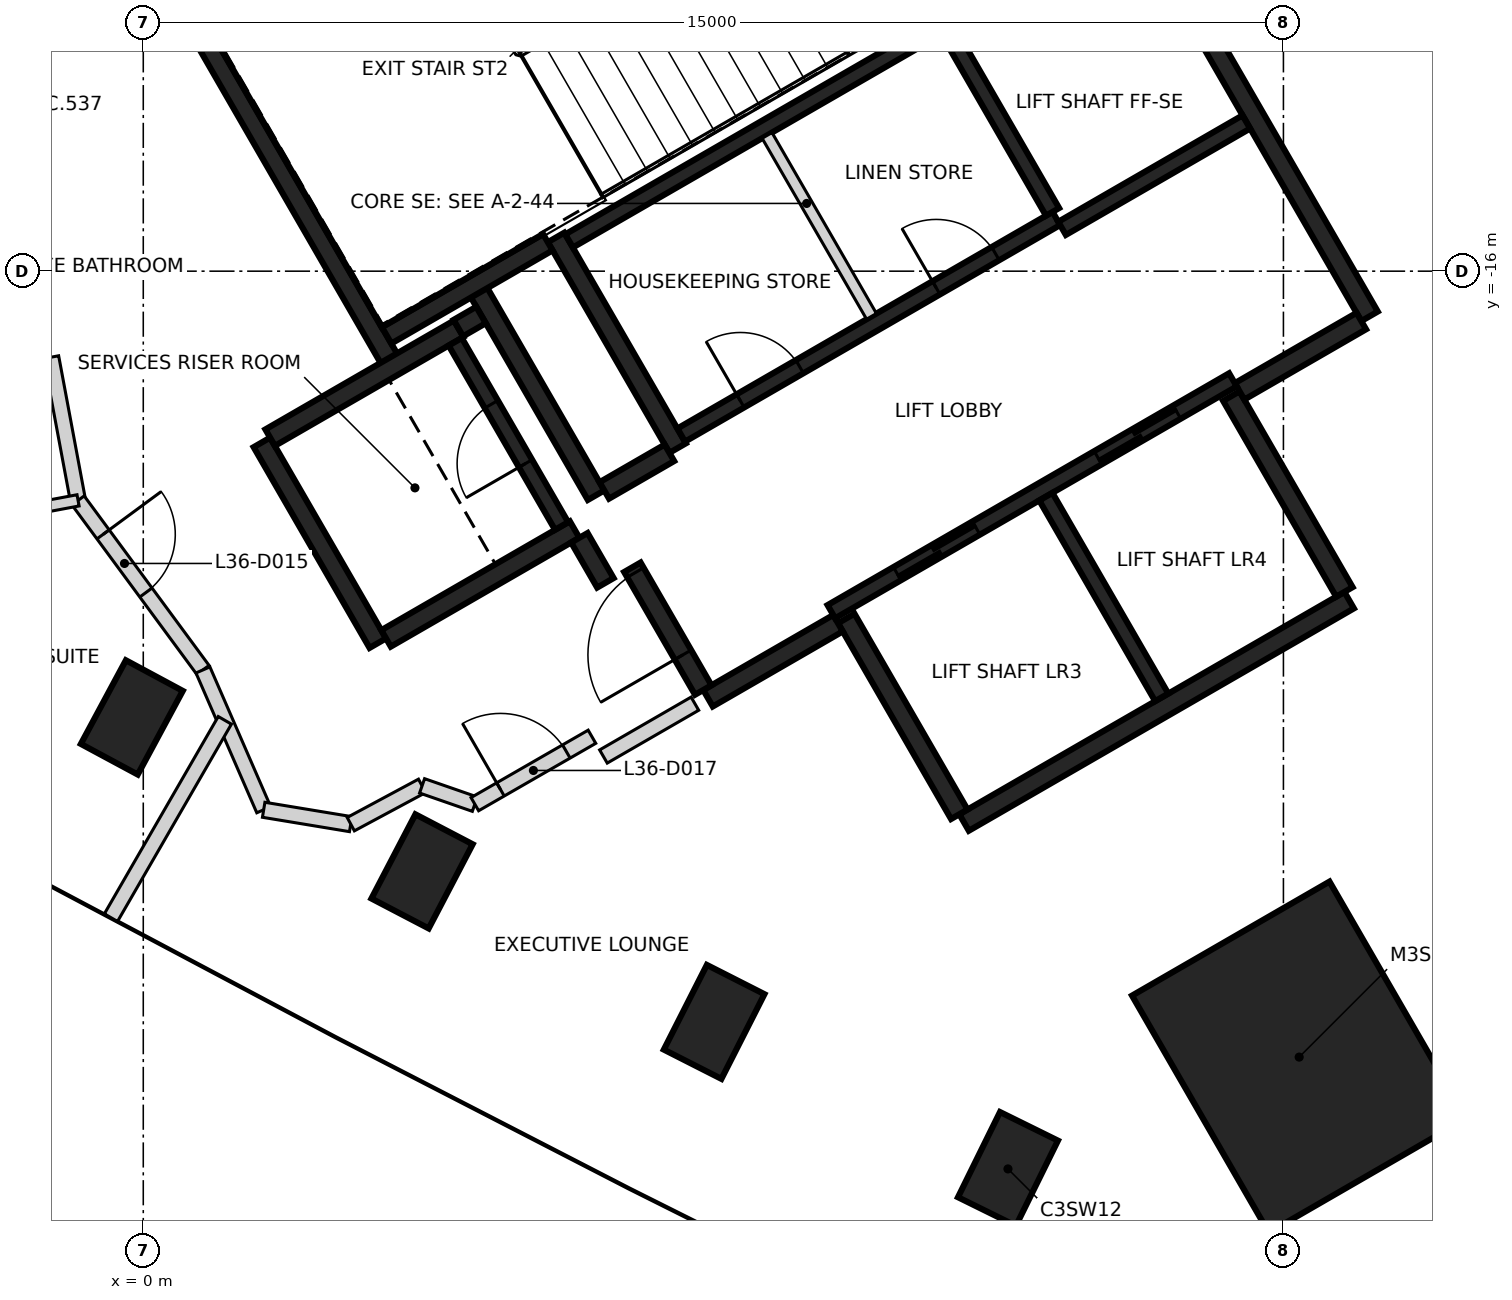
"""IFC4 building model, lengths in metres.
Left out: names, types, materials, properties, quantities, classifications, styles, units other than length and angle.
Written with IfcOpenShell. Run it as: python <this file> out.ifc"""

import sys

from ifc_helpers import new_model, si_unit, direction, frame, frame_2d, origin, origin_2d, place, context, subcontext, project, spatial, rectangle, extrude, element, fill, save


model = new_model("IFC4")
c1 = context("Model", 3, precision=1e-05, world=origin(), true_north=direction((0.0, 1.0)))
c2 = subcontext(c1, "Body", "Model", "MODEL_VIEW")
j1 = project(units=[si_unit("LENGTHUNIT", "METRE"), si_unit("PLANEANGLEUNIT", "RADIAN")], contexts=[c1])
p1 = place(None, origin())
s1 = spatial("IfcSite", under=j1, at=p1, CompositionType="ELEMENT")
p2 = place(p1, origin())
s2 = spatial("IfcBuilding", under=s1, at=p2, CompositionType="ELEMENT")
p3 = place(p2, frame((0.0, 0.0, 146.8)))
s3 = spatial("IfcBuildingStorey", under=s2, at=p3, CompositionType="ELEMENT", Elevation=146.8)
for number, where, z_axis, x_axis in (
    (1, (-0.151, -21.871, -0.4), (0.0, 0.0, 1.0), (0.474, 0.881, 0.0)),
    (2, (3.667, -23.896, -0.4), (0.0, 0.0, 1.0), (0.463, 0.886, 0.0)),
    (3, (7.51, -25.876, -0.4), (0.0, 0.0, 1.0), (0.453, 0.892, 0.0)),
    (4, (11.376, -27.811, -0.4), (0.0, 0.0, 1.0), (0.442, 0.897, 0.0)),
):
    element("IfcColumn", number, at=place(p3, frame(where, z_axis=z_axis, x_axis=x_axis)), inside=s3, PredefinedType="COLUMN", context=c2, shape_type="SweptSolid", body=[
        extrude(rectangle(XDim=1.25, YDim=0.85, at=origin_2d()), origin(), (0.0, 0.0, 1.0), 3.6),
    ])
p4 = place(p3, frame((15.207, -26.34, -0.4), z_axis=(0.0, 0.0, 1.0), x_axis=(-0.5, 0.866025403784, 0.0)))
e5 = element("IfcColumn", 5, at=p4, inside=s3, PredefinedType="COLUMN", context=c2, shape_type="SweptSolid", body=[
    extrude(rectangle(XDim=3.6, YDim=3.0, at=origin_2d()), origin(), (0.0, 0.0, 1.0), 3.6),
])
p5 = place(p3, frame((13.008, -11.181, 0.0), z_axis=(0.0, 0.0, 1.0), x_axis=(0.500004234368, -0.866022959057, 0.0)))
e6 = element("IfcWall", 6, at=p5, inside=s3, PredefinedType="SHEAR", context=c2, shape_type="SweptSolid", body=[
    extrude(rectangle(XDim=6.25, YDim=0.25, at=frame_2d((3.125, 0.0))), origin(), (0.0, 0.0, 1.0), 3.2),
])
p6 = place(p3, frame((15.865, -20.328, 0.0), z_axis=(0.0, 0.0, 1.0), x_axis=(-0.86602852612, -0.499994591916, 0.0)))
e7 = element("IfcWall", 7, at=p6, inside=s3, PredefinedType="SHEAR", context=c2, shape_type="SweptSolid", body=[
    extrude(rectangle(XDim=5.85, YDim=0.25, at=frame_2d((2.925, 0.0))), origin(), (0.0, 0.0, 1.0), 3.2),
])
p7 = place(p3, frame((3.235, -17.153, 0.0), z_axis=(0.0, 0.0, 1.0), x_axis=(-0.500008851346, 0.866020293397, 0.0)))
e8 = element("IfcWall", 8, at=p7, inside=s3, PredefinedType="SHEAR", context=c2, shape_type="SweptSolid", body=[
    extrude(rectangle(XDim=5.51, YDim=0.25, at=frame_2d((2.755, 0.0))), origin(), (0.0, 0.0, 1.0), 3.2),
])
p8 = place(p3, frame((7.031, -18.327, 0.0), z_axis=(0.0, 0.0, 1.0), x_axis=(-0.499971222258, 0.866042017984, 0.0)))
e9 = element("IfcWall", 9, at=p8, inside=s3, PredefinedType="SHEAR", context=c2, shape_type="SweptSolid", body=[
    extrude(rectangle(XDim=3.2, YDim=0.25, at=frame_2d((1.6, 0.0))), origin(), (0.0, 0.0, 1.0), 3.2),
])
for number, where, z_axis, x_axis in (
    (10, (14.315, -17.644, 0.0), (0.0, 0.0, 1.0), (0.5, -0.866, 0.0)),
    (11, (10.736, -23.145, 0.0), (0.0, 0.0, 1.0), (-0.5, 0.866, 0.0)),
):
    element("IfcWall", number, at=place(p3, frame(where, z_axis=z_axis, x_axis=x_axis)), inside=s3, PredefinedType="SHEAR", context=c2, shape_type="SweptSolid", body=[
        extrude(rectangle(XDim=2.974, YDim=0.25, at=frame_2d((1.487, 0.0))), origin(), (0.0, 0.0, 1.0), 3.2),
    ])
p9 = place(p3, frame((3.085, -20.894, 0.0), z_axis=(0.0, 0.0, 1.0), x_axis=(-0.499978833458, 0.866037623948, 0.0)))
e12 = element("IfcWall", 12, at=p9, inside=s3, PredefinedType="SHEAR", context=c2, shape_type="SweptSolid", body=[
    extrude(rectangle(XDim=3.05, YDim=0.25, at=frame_2d((1.525, 0.0))), origin(), (0.0, 0.0, 1.0), 3.2),
])
p10 = place(p3, frame((1.669, -18.19, 0.0), z_axis=(0.0, 0.0, 1.0), x_axis=(0.866042235819, 0.499970844928, 0.0)))
e13 = element("IfcWall", 13, at=p10, inside=s3, PredefinedType="SHEAR", context=c2, shape_type="SweptSolid", body=[
    extrude(rectangle(XDim=2.865, YDim=0.25, at=frame_2d((1.432, 0.0))), origin(), (0.0, 0.0, 1.0), 3.2),
])
p11 = place(p3, frame((5.675, -19.399, 0.0), z_axis=(0.0, 0.0, 1.0), x_axis=(-0.866026637627, -0.499997862916, 0.0)))
e14 = element("IfcWall", 14, at=p11, inside=s3, PredefinedType="SHEAR", context=c2, shape_type="SweptSolid", body=[
    extrude(rectangle(XDim=2.865, YDim=0.25, at=frame_2d((1.432, 0.0))), origin(), (0.0, 0.0, 1.0), 3.2),
])
p12 = place(p3, frame((4.414, -16.276, 0.0), z_axis=(0.0, 0.0, 1.0), x_axis=(0.500003324108, -0.866023484601, 0.0)))
e15 = element("IfcWall", 15, at=p12, inside=s3, PredefinedType="SHEAR", context=c2, shape_type="SweptSolid", body=[
    extrude(rectangle(XDim=3.085, YDim=0.25, at=frame_2d((1.542, 0.0))), origin(), (0.0, 0.0, 1.0), 3.2),
])
p13 = place(p3, frame((5.322, -15.619, 0.0), z_axis=(0.0, 0.0, 1.0), x_axis=(-0.866026229868, -0.499998569178, 0.0)))
e16 = element("IfcWall", 16, at=p13, inside=s3, PredefinedType="SHEAR", context=c2, shape_type="SweptSolid", body=[
    extrude(rectangle(XDim=2.449, YDim=0.25, at=frame_2d((1.225, 0.0))), origin(), (0.0, 0.0, 1.0), 3.2),
])
p14 = place(p3, frame((9.14, -20.631, 0.0), z_axis=(0.0, 0.0, 1.0), x_axis=(-0.866043531843, -0.499968599967, 0.0)))
e17 = element("IfcWall", 17, at=p14, inside=s3, PredefinedType="SHEAR", context=c2, shape_type="SweptSolid", body=[
    extrude(rectangle(XDim=1.975, YDim=0.25, at=frame_2d((0.987, 0.0))), origin(), (0.0, 0.0, 1.0), 3.2),
])
p15 = place(p3, frame((16.025, -16.656, 0.0), z_axis=(0.0, 0.0, 1.0), x_axis=(-0.866016279763, -0.500015802937, 0.0)))
e18 = element("IfcWall", 18, at=p15, inside=s3, PredefinedType="SHEAR", context=c2, shape_type="SweptSolid", body=[
    extrude(rectangle(XDim=1.849, YDim=0.25, at=frame_2d((0.925, 0.0))), origin(), (0.0, 0.0, 1.0), 3.2),
])
p16 = place(p3, frame((7.367, -21.51, 0.0), z_axis=(0.0, 0.0, 1.0), x_axis=(-0.499983108224, 0.866035156036, 0.0)))
e19 = element("IfcWall", 19, at=p16, inside=s3, PredefinedType="SHEAR", context=c2, shape_type="SweptSolid", body=[
    extrude(rectangle(XDim=1.865, YDim=0.25, at=frame_2d((0.932, 0.0))), origin(), (0.0, 0.0, 1.0), 3.2),
])
p17 = place(p16, frame((0.535, 0.0, 0.0)))
e20 = element("IfcOpeningElement", 20, at=p17, cuts=e19, PredefinedType="OPENING", context=c2, shape_type="SweptSolid", body=[
    extrude(rectangle(XDim=1.25, YDim=2.1, at=frame_2d((0.625, 1.05))), frame((0.0, 0.135, 0.0), z_axis=(0.0, -1.0, 0.0), x_axis=(1.0, 0.0, 0.0)), (0.0, 0.0, 1.0), 0.27),
])
p18 = place(p3, frame((6.065, -18.885, 0.0), z_axis=(0.0, 0.0, 1.0), x_axis=(0.866017078145, 0.500014420154, 0.0)))
e21 = element("IfcWall", 21, at=p18, inside=s3, PredefinedType="SHEAR", context=c2, shape_type="SweptSolid", body=[
    extrude(rectangle(XDim=0.989, YDim=0.25, at=frame_2d((0.495, 0.0))), origin(), (0.0, 0.0, 1.0), 3.2),
])
p19 = place(p3, frame((6.08, -20.1, 0.0), z_axis=(0.0, 0.0, 1.0), x_axis=(-0.500051773299, 0.865995510393, 0.0)))
e22 = element("IfcWall", 22, at=p19, inside=s3, PredefinedType="SHEAR", context=c2, shape_type="SweptSolid", body=[
    extrude(rectangle(XDim=0.685, YDim=0.25, at=frame_2d((0.342, 0.0))), origin(), (0.0, 0.0, 1.0), 3.2),
])
p20 = place(p3, frame((4.145, -16.749, 0.0), z_axis=(0.0, 0.0, 1.0), x_axis=(0.866185586049, 0.49972245349, 0.0)))
e23 = element("IfcWall", 23, at=p20, inside=s3, PredefinedType="SHEAR", context=c2, shape_type="SweptSolid", body=[
    extrude(rectangle(XDim=0.344, YDim=0.25, at=frame_2d((0.172, 0.0))), origin(), (0.0, 0.0, 1.0), 3.2),
])
p21 = place(p3, frame((9.052, -20.48, 0.0), z_axis=(0.0, 0.0, 1.0), x_axis=(0.866030299012, 0.499991521122, 0.0)))
e24 = element("IfcWall", 24, at=p21, inside=s3, PredefinedType="SHEAR", context=c2, shape_type="SweptSolid", body=[
    extrude(rectangle(XDim=6.1, YDim=0.2, at=frame_2d((3.05, 0.0))), origin(), (0.0, 0.0, 1.0), 3.2),
])
p22 = place(p21, frame((1.0, 0.0, 0.0)))
e25 = element("IfcOpeningElement", 25, at=p22, cuts=e24, PredefinedType="OPENING", context=c2, shape_type="SweptSolid", body=[
    extrude(rectangle(XDim=1.2, YDim=2.1, at=frame_2d((0.6, 1.05))), frame((0.0, 0.11, 0.0), z_axis=(0.0, -1.0, 0.0), x_axis=(1.0, 0.0, 0.0)), (0.0, 0.0, 1.0), 0.22),
])
p23 = place(p21, frame((4.05, 0.0, 0.0)))
e26 = element("IfcOpeningElement", 26, at=p23, cuts=e24, PredefinedType="OPENING", context=c2, shape_type="SweptSolid", body=[
    extrude(rectangle(XDim=1.2, YDim=2.1, at=frame_2d((0.6, 1.05))), frame((0.0, 0.11, 0.0), z_axis=(0.0, -1.0, 0.0), x_axis=(1.0, 0.0, 0.0)), (0.0, 0.0, 1.0), 0.22),
])
p24 = place(p3, frame((10.538, -12.752, 0.0), z_axis=(0.0, 0.0, 1.0), x_axis=(-0.866038630372, -0.499977090179, 0.0)))
e27 = element("IfcWall", 27, at=p24, inside=s3, PredefinedType="SHEAR", context=c2, shape_type="SweptSolid", body=[
    extrude(rectangle(XDim=5.699, YDim=0.2, at=frame_2d((2.85, 0.0))), origin(), (0.0, 0.0, 1.0), 3.2),
])
p25 = place(p3, frame((7.077, -18.156, 0.0), z_axis=(0.0, 0.0, 1.0), x_axis=(0.866038630372, 0.499977090179, 0.0)))
e28 = element("IfcWall", 28, at=p25, inside=s3, PredefinedType="SHEAR", context=c2, shape_type="SweptSolid", body=[
    extrude(rectangle(XDim=5.699, YDim=0.2, at=frame_2d((2.85, 0.0))), origin(), (0.0, 0.0, 1.0), 3.2),
])
p26 = place(p25, frame((0.899, 0.0, 0.0)))
e29 = element("IfcOpeningElement", 29, at=p26, cuts=e28, PredefinedType="OPENING", context=c2, shape_type="SweptSolid", body=[
    extrude(rectangle(XDim=0.9, YDim=2.1, at=frame_2d((0.45, 1.05))), frame((0.0, 0.11, 0.0), z_axis=(0.0, -1.0, 0.0), x_axis=(1.0, 0.0, 0.0)), (0.0, 0.0, 1.0), 0.22),
])
p27 = place(p25, frame((3.874, 0.0, 0.0)))
e30 = element("IfcOpeningElement", 30, at=p27, cuts=e28, PredefinedType="OPENING", context=c2, shape_type="SweptSolid", body=[
    extrude(rectangle(XDim=0.9, YDim=2.1, at=frame_2d((0.45, 1.05))), frame((0.0, 0.11, 0.0), z_axis=(0.0, -1.0, 0.0), x_axis=(1.0, 0.0, 0.0)), (0.0, 0.0, 1.0), 0.22),
])
p28 = place(p3, frame((11.875, -18.967, 0.0), z_axis=(0.0, 0.0, 1.0), x_axis=(0.49998131003, -0.866036194175, 0.0)))
e31 = element("IfcWall", 31, at=p28, inside=s3, PredefinedType="SHEAR", context=c2, shape_type="SweptSolid", body=[
    extrude(rectangle(XDim=3.048, YDim=0.2, at=frame_2d((1.524, 0.0))), origin(), (0.0, 0.0, 1.0), 3.2),
])
p29 = place(p3, frame((5.503, -19.352, 0.0), z_axis=(0.0, 0.0, 1.0), x_axis=(-0.499986818241, 0.866033014143, 0.0)))
e32 = element("IfcWall", 32, at=p29, inside=s3, PredefinedType="SHEAR", context=c2, shape_type="SweptSolid", body=[
    extrude(rectangle(XDim=2.798, YDim=0.2, at=frame_2d((1.399, 0.0))), origin(), (0.0, 0.0, 1.0), 3.2),
])
p30 = place(p29, frame((0.949, 0.0, 0.0)))
e33 = element("IfcOpeningElement", 33, at=p30, cuts=e32, PredefinedType="OPENING", context=c2, shape_type="SweptSolid", body=[
    extrude(rectangle(XDim=0.9, YDim=2.1, at=frame_2d((0.45, 1.05))), frame((0.0, 0.11, 0.0), z_axis=(0.0, -1.0, 0.0), x_axis=(1.0, 0.0, 0.0)), (0.0, 0.0, 1.0), 0.22),
])
p31 = place(p3, frame((11.963, -15.22, 0.0), z_axis=(0.0, 0.0, 1.0), x_axis=(-0.500034990121, 0.866005201286, 0.0)))
e34 = element("IfcWall", 34, at=p31, inside=s3, PredefinedType="SHEAR", context=c2, shape_type="SweptSolid", body=[
    extrude(rectangle(XDim=2.75, YDim=0.2, at=frame_2d((1.375, 0.0))), origin(), (0.0, 0.0, 1.0), 3.2),
])
p32 = place(p3, frame((14.512, -14.037, 0.0), z_axis=(0.0, 0.0, 1.0), x_axis=(-0.866044696403, -0.499966582715, 0.0)))
e35 = element("IfcWall", 35, at=p32, inside=s3, PredefinedType="SHEAR", context=c2, shape_type="SweptSolid", body=[
    extrude(rectangle(XDim=2.799, YDim=0.2, at=frame_2d((1.399, 0.0))), origin(), (0.0, 0.0, 1.0), 3.2),
])
p33 = place(p3, frame((8.207, -14.214, 0.0), z_axis=(0.0, 0.0, 1.0), x_axis=(0.50002746344, -0.86600954718, 0.0)))
e36 = element("IfcWall", 36, at=p33, inside=s3, PredefinedType="PARTITIONING", context=c2, shape_type="SweptSolid", body=[
    extrude(rectangle(XDim=2.748, YDim=0.15, at=frame_2d((1.374, 0.0))), origin(), (0.0, 0.0, 1.0), 3.2),
])
p34 = place(p3, frame((-1.212, -17.131, 0.0), z_axis=(0.0, 0.0, 1.0), x_axis=(0.183680924698, -0.982985919483, 0.0)))
e37 = element("IfcWall", 37, at=p34, inside=s3, PredefinedType="PARTITIONING", context=c2, shape_type="SweptSolid", body=[
    extrude(rectangle(XDim=1.917, YDim=0.2, at=frame_2d((0.958, 0.0))), origin(), (0.0, 0.0, 1.0), 3.2),
])
p35 = place(p3, frame((-0.858, -19.016, 0.0), z_axis=(0.0, 0.0, 1.0), x_axis=(0.593123867414, -0.805111220829, 0.0)))
e38 = element("IfcWall", 38, at=p35, inside=s3, PredefinedType="PARTITIONING", context=c2, shape_type="SweptSolid", body=[
    extrude(rectangle(XDim=2.77, YDim=0.2, at=frame_2d((1.385, 0.0))), origin(), (0.0, 0.0, 1.0), 3.2),
])
p36 = place(p35, frame((0.555, 0.0, 0.0)))
e39 = element("IfcOpeningElement", 39, at=p36, cuts=e38, PredefinedType="OPENING", context=c2, shape_type="SweptSolid", body=[
    extrude(rectangle(XDim=0.95, YDim=2.1, at=frame_2d((0.475, 1.05))), frame((0.0, 0.11, 0.0), z_axis=(0.0, -1.0, 0.0), x_axis=(1.0, 0.0, 0.0)), (0.0, 0.0, 1.0), 0.22),
])
p37 = place(p3, frame((0.785, -21.246, 0.0), z_axis=(0.0, 0.0, 1.0), x_axis=(0.398864077761, -0.917010058545, 0.0)))
e40 = element("IfcWall", 40, at=p37, inside=s3, PredefinedType="PARTITIONING", context=c2, shape_type="SweptSolid", body=[
    extrude(rectangle(XDim=2.006, YDim=0.2, at=frame_2d((1.003, 0.0))), origin(), (0.0, 0.0, 1.0), 2.3),
])
p38 = place(p3, frame((1.584, -23.086, 0.0), z_axis=(0.0, 0.0, 1.0), x_axis=(0.986654221629, -0.162829502674, 0.0)))
e41 = element("IfcWall", 41, at=p38, inside=s3, PredefinedType="PARTITIONING", context=c2, shape_type="SweptSolid", body=[
    extrude(rectangle(XDim=1.16, YDim=0.2, at=frame_2d((0.58, 0.0))), origin(), (0.0, 0.0, 1.0), 2.3),
])
p39 = place(p3, frame((2.73, -23.275, 0.0), z_axis=(0.0, 0.0, 1.0), x_axis=(0.880927165636, 0.473251866182, 0.0)))
e42 = element("IfcWall", 42, at=p39, inside=s3, PredefinedType="PARTITIONING", context=c2, shape_type="SweptSolid", body=[
    extrude(rectangle(XDim=1.065, YDim=0.2, at=frame_2d((0.532, 0.0))), origin(), (0.0, 0.0, 1.0), 3.2),
])
p40 = place(p3, frame((3.668, -22.771, 0.0), z_axis=(0.0, 0.0, 1.0), x_axis=(0.944689393684, -0.327966384652, 0.0)))
e43 = element("IfcWall", 43, at=p40, inside=s3, PredefinedType="PARTITIONING", context=c2, shape_type="SweptSolid", body=[
    extrude(rectangle(XDim=0.735, YDim=0.2, at=frame_2d((0.367, 0.0))), origin(), (0.0, 0.0, 1.0), 3.2),
])
p41 = place(p3, frame((4.362, -23.012, 0.0), z_axis=(0.0, 0.0, 1.0), x_axis=(0.866692617793, 0.49884256661, 0.0)))
e44 = element("IfcWall", 44, at=p41, inside=s3, PredefinedType="PARTITIONING", context=c2, shape_type="SweptSolid", body=[
    extrude(rectangle(XDim=1.778, YDim=0.2, at=frame_2d((0.889, 0.0))), origin(), (0.0, 0.0, 1.0), 3.2),
])
p42 = place(p41, frame((0.389, 0.0, 0.0)))
e45 = element("IfcOpeningElement", 45, at=p42, cuts=e44, PredefinedType="OPENING", context=c2, shape_type="SweptSolid", body=[
    extrude(rectangle(XDim=1.0, YDim=2.1, at=frame_2d((0.5, 1.05))), frame((0.0, 0.11, 0.0), z_axis=(0.0, -1.0, 0.0), x_axis=(1.0, 0.0, 0.0)), (0.0, 0.0, 1.0), 0.22),
])
p43 = place(p3, frame((6.054, -22.385, 0.0), z_axis=(0.0, 0.0, 1.0), x_axis=(0.86593101922, 0.500163443238, 0.0)))
e46 = element("IfcWall", 46, at=p43, inside=s3, PredefinedType="PARTITIONING", context=c2, shape_type="SweptSolid", body=[
    extrude(rectangle(XDim=1.39, YDim=0.2, at=frame_2d((0.695, 0.0))), origin(), (0.0, 0.0, 1.0), 3.2),
])
p44 = place(p3, frame((-0.425, -24.505, 0.0), z_axis=(0.0, 0.0, 1.0), x_axis=(0.499915194772, 0.86607436057, 0.0)))
e47 = element("IfcWall", 47, at=p44, inside=s3, PredefinedType="PARTITIONING", context=c2, shape_type="SweptSolid", body=[
    extrude(rectangle(XDim=2.997, YDim=0.2, at=frame_2d((1.499, 0.0))), origin(), (0.0, 0.0, 1.0), 2.3),
])
p45 = place(p3, frame((-3.807, -19.566, 0.0), z_axis=(0.0, 0.0, 1.0), x_axis=(0.982987155193, 0.183674311555, 0.0)))
e48 = element("IfcWall", 48, at=p45, inside=s3, PredefinedType="PARTITIONING", context=c2, shape_type="SweptSolid", body=[
    extrude(rectangle(XDim=3.0, YDim=0.15, at=frame_2d((1.5, 0.0))), origin(), (0.0, 0.0, 1.0), 3.2),
])
p46 = place(p45, frame((1.46, 0.0, 0.0)))
e49 = element("IfcOpeningElement", 49, at=p46, cuts=e48, PredefinedType="OPENING", context=c2, shape_type="SweptSolid", body=[
    extrude(rectangle(XDim=0.8, YDim=2.1, at=frame_2d((0.4, 1.05))), frame((0.0, 0.085, 0.0), z_axis=(0.0, -1.0, 0.0), x_axis=(1.0, 0.0, 0.0)), (0.0, 0.0, 1.0), 0.17),
])
p47 = place(p22, origin())
e50 = element("IfcDoor", 50, at=p47, inside=s3, OperationType="DOUBLE_DOOR_SLIDING", PredefinedType="DOOR", context=c2, shape_type="SweptSolid", body=[
    extrude(rectangle(XDim=1.2, YDim=2.1, at=frame_2d((0.6, 1.05))), frame((0.0, 0.025, 0.0), z_axis=(0.0, -1.0, 0.0), x_axis=(1.0, 0.0, 0.0)), (0.0, 0.0, 1.0), 0.05),
])
fill(e25, e50)
p48 = place(p23, origin())
e51 = element("IfcDoor", 51, at=p48, inside=s3, OperationType="DOUBLE_DOOR_SLIDING", PredefinedType="DOOR", context=c2, shape_type="SweptSolid", body=[
    extrude(rectangle(XDim=1.2, YDim=2.1, at=frame_2d((0.6, 1.05))), frame((0.0, 0.025, 0.0), z_axis=(0.0, -1.0, 0.0), x_axis=(1.0, 0.0, 0.0)), (0.0, 0.0, 1.0), 0.05),
])
fill(e26, e51)
p49 = place(p17, origin())
e52 = element("IfcDoor", 52, at=p49, inside=s3, OperationType="SINGLE_SWING_LEFT", PredefinedType="DOOR", context=c2, shape_type="SweptSolid", body=[
    extrude(rectangle(XDim=1.25, YDim=2.1, at=frame_2d((0.625, 1.05))), frame((0.0, 0.025, 0.0), z_axis=(0.0, -1.0, 0.0), x_axis=(1.0, 0.0, 0.0)), (0.0, 0.0, 1.0), 0.05),
])
fill(e20, e52)
p50 = place(p26, origin())
e53 = element("IfcDoor", 53, at=p50, inside=s3, OperationType="SINGLE_SWING_RIGHT", PredefinedType="DOOR", context=c2, shape_type="SweptSolid", body=[
    extrude(rectangle(XDim=0.9, YDim=2.1, at=frame_2d((0.45, 1.05))), frame((0.0, 0.025, 0.0), z_axis=(0.0, -1.0, 0.0), x_axis=(1.0, 0.0, 0.0)), (0.0, 0.0, 1.0), 0.05),
])
fill(e29, e53)
p51 = place(p27, origin())
e54 = element("IfcDoor", 54, at=p51, inside=s3, OperationType="SINGLE_SWING_LEFT", PredefinedType="DOOR", context=c2, shape_type="SweptSolid", body=[
    extrude(rectangle(XDim=0.9, YDim=2.1, at=frame_2d((0.45, 1.05))), frame((0.0, 0.025, 0.0), z_axis=(0.0, -1.0, 0.0), x_axis=(1.0, 0.0, 0.0)), (0.0, 0.0, 1.0), 0.05),
])
fill(e30, e54)
p52 = place(p30, origin())
e55 = element("IfcDoor", 55, at=p52, inside=s3, OperationType="SINGLE_SWING_RIGHT", PredefinedType="DOOR", context=c2, shape_type="SweptSolid", body=[
    extrude(rectangle(XDim=0.9, YDim=2.1, at=frame_2d((0.45, 1.05))), frame((0.0, 0.025, 0.0), z_axis=(0.0, -1.0, 0.0), x_axis=(1.0, 0.0, 0.0)), (0.0, 0.0, 1.0), 0.05),
])
fill(e33, e55)
p53 = place(p36, frame((0.95, 0.0, 0.0), z_axis=(0.0, 0.0, 1.0), x_axis=(-1.0, 0.0, 0.0)))
e56 = element("IfcDoor", 56, at=p53, inside=s3, OperationType="SINGLE_SWING_LEFT", PredefinedType="DOOR", context=c2, shape_type="SweptSolid", body=[
    extrude(rectangle(XDim=0.95, YDim=2.1, at=frame_2d((0.475, 1.05))), frame((0.0, 0.025, 0.0), z_axis=(0.0, -1.0, 0.0), x_axis=(1.0, 0.0, 0.0)), (0.0, 0.0, 1.0), 0.05),
])
fill(e39, e56)
p54 = place(p42, frame((1.0, 0.0, 0.0), z_axis=(0.0, 0.0, 1.0), x_axis=(-1.0, 0.0, 0.0)))
e57 = element("IfcDoor", 57, at=p54, inside=s3, OperationType="SINGLE_SWING_LEFT", PredefinedType="DOOR", context=c2, shape_type="SweptSolid", body=[
    extrude(rectangle(XDim=1.0, YDim=2.1, at=frame_2d((0.5, 1.05))), frame((0.0, 0.025, 0.0), z_axis=(0.0, -1.0, 0.0), x_axis=(1.0, 0.0, 0.0)), (0.0, 0.0, 1.0), 0.05),
])
fill(e45, e57)
save(model, sys.argv[1])
